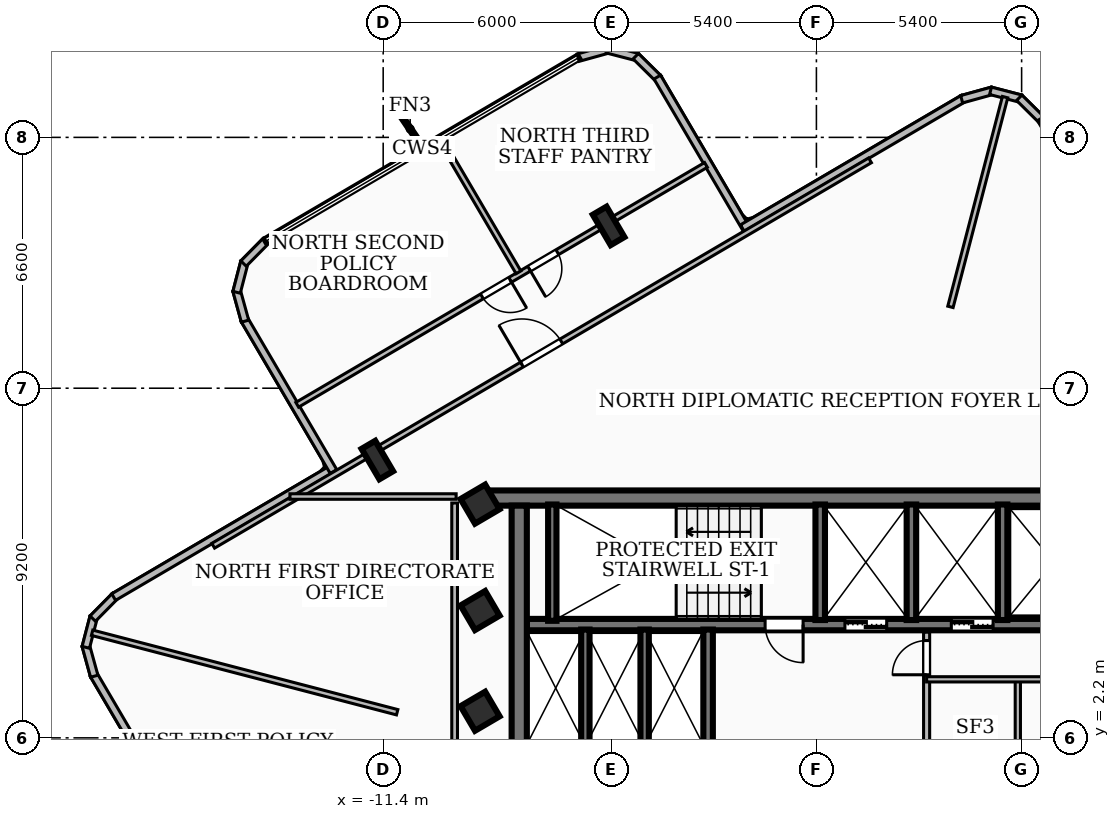
"""IFC4 building model, lengths in metres.
Left out: names, types, materials, properties, quantities, classifications, styles, units other than length and angle.
Written with IfcOpenShell. Run it as: python <this file> out.ifc"""

import sys

from ifc_helpers import new_model, si_unit, direction, frame, frame_2d, origin, origin_2d, place, context, subcontext, project, spatial, rectangle, i_section, extrude, element, fill, save


model = new_model("IFC4")
c1 = context("Model", 3, precision=1e-05, world=origin(), true_north=direction((0.0, 1.0)))
c2 = subcontext(c1, "Body", "Model", "MODEL_VIEW")
j1 = project(units=[si_unit("LENGTHUNIT", "METRE"), si_unit("PLANEANGLEUNIT", "RADIAN")], contexts=[c1])
p1 = place(None, origin())
s1 = spatial("IfcSite", under=j1, at=p1, CompositionType="ELEMENT")
p2 = place(p1, origin())
s2 = spatial("IfcBuilding", under=s1, at=p2, CompositionType="ELEMENT")
p3 = place(p2, frame((0.0, 0.0, 212.04)))
s3 = spatial("IfcBuildingStorey", under=s2, at=p3, CompositionType="ELEMENT", Elevation=212.04)
p4 = place(p3, frame((-8.78, 8.51, 0.0), z_axis=(0.0, 0.0, 1.0), x_axis=(1.0, 0.0, 0.0)))
e1 = element("IfcWall", 1, at=p4, inside=s3, PredefinedType="SHEAR", context=c2, shape_type="SweptSolid", body=[
    extrude(rectangle(XDim=17.56, YDim=0.4, at=frame_2d((8.78, 0.0))), origin(), (0.0, 0.0, 1.0), 3.16),
])
p5 = place(p3, frame((-7.82, 1.95, 0.0), z_axis=(0.0, 0.0, 1.0), x_axis=(0.0, 1.0, 0.0)))
e2 = element("IfcWall", 2, at=p5, inside=s3, PredefinedType="SHEAR", context=c2, shape_type="SweptSolid", body=[
    extrude(rectangle(XDim=6.36, YDim=0.4, at=frame_2d((3.18, 0.0))), origin(), (0.0, 0.0, 1.0), 3.16),
])
p6 = place(p3, frame((7.62, 5.18, 0.0), z_axis=(0.0, 0.0, 1.0), x_axis=(-1.0, 0.0, 0.0)))
e3 = element("IfcWall", 3, at=p6, inside=s3, PredefinedType="SOLIDWALL", context=c2, shape_type="SweptSolid", body=[
    extrude(rectangle(XDim=15.24, YDim=0.3, at=frame_2d((7.62, 0.0))), origin(), (0.0, 0.0, 1.0), 3.16),
])
p7 = place(p6, frame((5.77, 0.0, 0.0)))
e4 = element("IfcOpeningElement", 4, at=p7, cuts=e3, PredefinedType="OPENING", context=c2, shape_type="SweptSolid", body=[
    extrude(rectangle(XDim=1.1, YDim=2.15, at=frame_2d((0.55, 1.075))), frame((0.0, 0.16, 0.0), z_axis=(0.0, -1.0, 0.0), x_axis=(1.0, 0.0, 0.0)), (0.0, 0.0, 1.0), 0.32),
])
p8 = place(p6, frame((2.97, 0.0, 0.0)))
e5 = element("IfcOpeningElement", 5, at=p8, cuts=e3, PredefinedType="OPENING", context=c2, shape_type="SweptSolid", body=[
    extrude(rectangle(XDim=1.1, YDim=2.15, at=frame_2d((0.55, 1.075))), frame((0.0, 0.16, 0.0), z_axis=(0.0, -1.0, 0.0), x_axis=(1.0, 0.0, 0.0)), (0.0, 0.0, 1.0), 0.32),
])
p9 = place(p6, frame((7.97, 0.0, 0.0)))
e6 = element("IfcOpeningElement", 6, at=p9, cuts=e3, PredefinedType="OPENING", context=c2, shape_type="SweptSolid", body=[
    extrude(rectangle(XDim=1.0, YDim=2.1, at=frame_2d((0.5, 1.05))), frame((0.0, 0.16, 0.0), z_axis=(0.0, -1.0, 0.0), x_axis=(1.0, 0.0, 0.0)), (0.0, 0.0, 1.0), 0.32),
])
p10 = place(p3, frame((-6.95, 5.28, 0.0), z_axis=(0.0, 0.0, 1.0), x_axis=(0.0, 1.0, 0.0)))
e7 = element("IfcWall", 7, at=p10, inside=s3, PredefinedType="SOLIDWALL", context=c2, shape_type="SweptSolid", body=[
    extrude(rectangle(XDim=3.06, YDim=0.22, at=frame_2d((1.53, 0.0))), origin(), (0.0, 0.0, 1.0), 3.16),
])
for number, where, z_axis, x_axis in (
    (8, (0.1, 5.3, 0.0), (0.0, 0.0, 1.0), (0.0, 1.0, 0.0)),
    (9, (2.5, 5.3, 0.0), (0.0, 0.0, 1.0), (0.0, 1.0, 0.0)),
    (10, (4.9, 5.3, 0.0), (0.0, 0.0, 1.0), (0.0, 1.0, 0.0)),
):
    element("IfcWall", number, at=place(p3, frame(where, z_axis=z_axis, x_axis=x_axis)), inside=s3, PredefinedType="SOLIDWALL", context=c2, shape_type="SweptSolid", body=[
        extrude(rectangle(XDim=3.04, YDim=0.25, at=frame_2d((1.52, 0.0))), origin(), (0.0, 0.0, 1.0), 3.16),
    ])
p11 = place(p3, frame((-2.85, 1.98, 0.0), z_axis=(0.0, 0.0, 1.0), x_axis=(0.0, 1.0, 0.0)))
e11 = element("IfcWall", 11, at=p11, inside=s3, PredefinedType="SOLIDWALL", context=c2, shape_type="SweptSolid", body=[
    extrude(rectangle(XDim=3.07, YDim=0.25, at=frame_2d((1.535, 0.0))), origin(), (0.0, 0.0, 1.0), 3.16),
])
for number, where, z_axis, x_axis in (
    (12, (-6.08, 1.98, 0.0), (0.0, 0.0, 1.0), (0.0, 1.0, 0.0)),
    (13, (-4.52, 1.98, 0.0), (0.0, 0.0, 1.0), (0.0, 1.0, 0.0)),
):
    element("IfcWall", number, at=place(p3, frame(where, z_axis=z_axis, x_axis=x_axis)), inside=s3, PredefinedType="SOLIDWALL", context=c2, shape_type="SweptSolid", body=[
        extrude(rectangle(XDim=3.07, YDim=0.22, at=frame_2d((1.535, 0.0))), origin(), (0.0, 0.0, 1.0), 3.16),
    ])
for number, where, z_axis, x_axis in (
    (14, (-8.85, 2.9, 0.0), (0.0, 0.0, 1.0), (0.863, 0.506, 0.0)),
    (15, (-8.85, 5.55, 0.0), (0.0, 0.0, 1.0), (0.863, 0.506, 0.0)),
    (16, (-8.85, 8.35, 0.0), (0.0, 0.0, 1.0), (0.863, 0.506, 0.0)),
):
    element("IfcColumn", number, at=place(p3, frame(where, z_axis=z_axis, x_axis=x_axis)), inside=s3, PredefinedType="COLUMN", context=c2, shape_type="SweptSolid", body=[
        extrude(rectangle(XDim=0.75, YDim=0.75, at=origin_2d()), origin(), (0.0, 0.0, 1.0), 3.42),
    ])
for number, where, z_axis, x_axis in (
    (17, (-5.468, 15.671, 0.0), (0.0, 0.0, 1.0), (0.863, 0.506, 0.0)),
    (18, (-11.554, 9.51, 0.0), (0.0, 0.0, 1.0), (0.863, 0.506, 0.0)),
):
    element("IfcColumn", number, at=place(p3, frame(where, z_axis=z_axis, x_axis=x_axis)), inside=s3, PredefinedType="COLUMN", context=c2, shape_type="SweptSolid", body=[
        extrude(i_section(OverallWidth=0.418, OverallDepth=0.927, WebThickness=0.019, FlangeThickness=0.032, at=origin_2d()), origin(), (0.0, 0.0, 1.0), 3.42),
    ])
p12 = place(p3, frame((-5.904, -18.492, 0.0), z_axis=(0.0, 0.0, 1.0), x_axis=(-0.506046465446, 0.862506217258, 0.0)))
e19 = element("IfcWall", 19, at=p12, inside=s3, PredefinedType="SOLIDWALL", context=c2, shape_type="SweptSolid", body=[
    extrude(rectangle(XDim=25.924, YDim=0.2, at=frame_2d((12.962, 0.0))), origin(), (0.0, 0.0, 1.0), 3.16),
])
p13 = place(p12, frame((0.85, 0.0, 0.85)))
e20 = element("IfcOpeningElement", 20, at=p13, cuts=e19, PredefinedType="OPENING", context=c2, shape_type="SweptSolid", body=[
    extrude(rectangle(XDim=2.4, YDim=1.85, at=frame_2d((1.2, 0.925))), frame((0.0, 0.11, 0.0), z_axis=(0.0, -1.0, 0.0), x_axis=(1.0, 0.0, 0.0)), (0.0, 0.0, 1.0), 0.22),
])
p14 = place(p3, frame((-19.003, 3.822, 0.0), z_axis=(0.0, 0.0, 1.0), x_axis=(-0.266246353668, 0.963905015631, 0.0)))
e21 = element("IfcWall", 21, at=p14, inside=s3, PredefinedType="SOLIDWALL", context=c2, shape_type="SweptSolid", body=[
    extrude(rectangle(XDim=0.838, YDim=0.2, at=frame_2d((0.419, 0.0))), origin(), (0.0, 0.0, 1.0), 3.16),
])
p15 = place(p3, frame((-19.225, 4.582, 0.0), z_axis=(0.0, 0.0, 1.0), x_axis=(0.251167733737, 0.967943577658, 0.0)))
e22 = element("IfcWall", 22, at=p15, inside=s3, PredefinedType="SOLIDWALL", context=c2, shape_type="SweptSolid", body=[
    extrude(rectangle(XDim=0.824, YDim=0.2, at=frame_2d((0.412, 0.0))), origin(), (0.0, 0.0, 1.0), 3.16),
])
p16 = place(p3, frame((-19.042, 5.338, 0.0), z_axis=(0.0, 0.0, 1.0), x_axis=(0.702877524881, 0.711310891957, 0.0)))
e23 = element("IfcWall", 23, at=p16, inside=s3, PredefinedType="SOLIDWALL", context=c2, shape_type="SweptSolid", body=[
    extrude(rectangle(XDim=0.84, YDim=0.2, at=frame_2d((0.42, 0.0))), origin(), (0.0, 0.0, 1.0), 3.16),
])
p17 = place(p3, frame((-18.492, 5.904, 0.0), z_axis=(0.0, 0.0, 1.0), x_axis=(0.86245977502, 0.506125613333, 0.0)))
e24 = element("IfcWall", 24, at=p17, inside=s3, PredefinedType="SOLIDWALL", context=c2, shape_type="SweptSolid", body=[
    extrude(rectangle(XDim=6.741, YDim=0.2, at=frame_2d((3.371, 0.0))), origin(), (0.0, 0.0, 1.0), 3.16),
])
p18 = place(p3, frame((-12.707, 9.207, 0.0), z_axis=(0.0, 0.0, 1.0), x_axis=(-0.505936854923, 0.862570518178, 0.0)))
e25 = element("IfcWall", 25, at=p18, inside=s3, PredefinedType="SOLIDWALL", context=c2, shape_type="SweptSolid", body=[
    extrude(rectangle(XDim=4.641, YDim=0.2, at=frame_2d((2.32, 0.0))), origin(), (0.0, 0.0, 1.0), 3.16),
])
p19 = place(p3, frame((-15.035, 13.164, 0.0), z_axis=(0.0, 0.0, 1.0), x_axis=(-0.266246353668, 0.963905015631, 0.0)))
e26 = element("IfcWall", 26, at=p19, inside=s3, PredefinedType="SOLIDWALL", context=c2, shape_type="SweptSolid", body=[
    extrude(rectangle(XDim=0.838, YDim=0.2, at=frame_2d((0.419, 0.0))), origin(), (0.0, 0.0, 1.0), 3.16),
])
p20 = place(p3, frame((-15.257, 13.924, 0.0), z_axis=(0.0, 0.0, 1.0), x_axis=(0.251167733737, 0.967943577658, 0.0)))
e27 = element("IfcWall", 27, at=p20, inside=s3, PredefinedType="SOLIDWALL", context=c2, shape_type="SweptSolid", body=[
    extrude(rectangle(XDim=0.824, YDim=0.2, at=frame_2d((0.412, 0.0))), origin(), (0.0, 0.0, 1.0), 3.16),
])
p21 = place(p3, frame((-15.074, 14.68, 0.0), z_axis=(0.0, 0.0, 1.0), x_axis=(0.702877524881, 0.711310891957, 0.0)))
e28 = element("IfcWall", 28, at=p21, inside=s3, PredefinedType="SOLIDWALL", context=c2, shape_type="SweptSolid", body=[
    extrude(rectangle(XDim=0.84, YDim=0.2, at=frame_2d((0.42, 0.0))), origin(), (0.0, 0.0, 1.0), 3.16),
])
p22 = place(p3, frame((-6.269, 20.097, 0.0), z_axis=(0.0, 0.0, 1.0), x_axis=(0.963925656212, 0.266171616247, 0.0)))
e29 = element("IfcWall", 29, at=p22, inside=s3, PredefinedType="SOLIDWALL", context=c2, shape_type="SweptSolid", body=[
    extrude(rectangle(XDim=0.838, YDim=0.2, at=frame_2d((0.419, 0.0))), origin(), (0.0, 0.0, 1.0), 3.16),
])
p23 = place(p3, frame((-5.509, 20.319, 0.0), z_axis=(0.0, 0.0, 1.0), x_axis=(0.967962254737, -0.251095745493, 0.0)))
e30 = element("IfcWall", 30, at=p23, inside=s3, PredefinedType="SOLIDWALL", context=c2, shape_type="SweptSolid", body=[
    extrude(rectangle(XDim=0.824, YDim=0.2, at=frame_2d((0.412, 0.0))), origin(), (0.0, 0.0, 1.0), 3.16),
])
p24 = place(p3, frame((-4.753, 20.136, 0.0), z_axis=(0.0, 0.0, 1.0), x_axis=(0.711167178618, -0.70302293281, 0.0)))
e31 = element("IfcWall", 31, at=p24, inside=s3, PredefinedType="SOLIDWALL", context=c2, shape_type="SweptSolid", body=[
    extrude(rectangle(XDim=0.839, YDim=0.2, at=frame_2d((0.42, 0.0))), origin(), (0.0, 0.0, 1.0), 3.16),
])
p25 = place(p3, frame((-4.187, 19.586, 0.0), z_axis=(0.0, 0.0, 1.0), x_axis=(0.505936854923, -0.862570518178, 0.0)))
e32 = element("IfcWall", 32, at=p25, inside=s3, PredefinedType="SOLIDWALL", context=c2, shape_type="SweptSolid", body=[
    extrude(rectangle(XDim=4.641, YDim=0.2, at=frame_2d((2.32, 0.0))), origin(), (0.0, 0.0, 1.0), 3.16),
])
p26 = place(p3, frame((-1.948, 15.612, 0.0), z_axis=(0.0, 0.0, 1.0), x_axis=(0.86259717351, 0.505891407569, 0.0)))
e33 = element("IfcWall", 33, at=p26, inside=s3, PredefinedType="SOLIDWALL", context=c2, shape_type="SweptSolid", body=[
    extrude(rectangle(XDim=6.742, YDim=0.2, at=frame_2d((3.371, 0.0))), origin(), (0.0, 0.0, 1.0), 3.16),
])
p27 = place(p3, frame((3.822, 19.003, 0.0), z_axis=(0.0, 0.0, 1.0), x_axis=(0.963905015631, 0.266246353668, 0.0)))
e34 = element("IfcWall", 34, at=p27, inside=s3, PredefinedType="SOLIDWALL", context=c2, shape_type="SweptSolid", body=[
    extrude(rectangle(XDim=0.838, YDim=0.2, at=frame_2d((0.419, 0.0))), origin(), (0.0, 0.0, 1.0), 3.16),
])
p28 = place(p3, frame((4.582, 19.225, 0.0), z_axis=(0.0, 0.0, 1.0), x_axis=(0.967943577658, -0.251167733737, 0.0)))
e35 = element("IfcWall", 35, at=p28, inside=s3, PredefinedType="SOLIDWALL", context=c2, shape_type="SweptSolid", body=[
    extrude(rectangle(XDim=0.824, YDim=0.2, at=frame_2d((0.412, 0.0))), origin(), (0.0, 0.0, 1.0), 3.16),
])
p29 = place(p3, frame((5.338, 19.042, 0.0), z_axis=(0.0, 0.0, 1.0), x_axis=(0.711310891957, -0.702877524881, 0.0)))
e36 = element("IfcWall", 36, at=p29, inside=s3, PredefinedType="SOLIDWALL", context=c2, shape_type="SweptSolid", body=[
    extrude(rectangle(XDim=0.84, YDim=0.2, at=frame_2d((0.42, 0.0))), origin(), (0.0, 0.0, 1.0), 3.16),
])
p30 = place(p3, frame((5.904, 18.492, 0.0), z_axis=(0.0, 0.0, 1.0), x_axis=(0.506017844805, -0.862523008817, 0.0)))
e37 = element("IfcWall", 37, at=p30, inside=s3, PredefinedType="SOLIDWALL", context=c2, shape_type="SweptSolid", body=[
    extrude(rectangle(XDim=6.741, YDim=0.2, at=frame_2d((3.37, 0.0))), origin(), (0.0, 0.0, 1.0), 3.16),
])
p31 = place(p3, frame((2.9, 2.04, 0.0), z_axis=(0.0, 0.0, 1.0), x_axis=(0.0, 1.0, 0.0)))
e38 = element("IfcWall", 38, at=p31, inside=s3, PredefinedType="PARTITIONING", context=c2, shape_type="SweptSolid", body=[
    extrude(rectangle(XDim=2.94, YDim=0.16, at=frame_2d((1.47, 0.0))), origin(), (0.0, 0.0, 1.0), 2.39),
])
p32 = place(p31, frame((1.82, 0.0, 0.0)))
e39 = element("IfcOpeningElement", 39, at=p32, cuts=e38, PredefinedType="OPENING", context=c2, shape_type="SweptSolid", body=[
    extrude(rectangle(XDim=0.9, YDim=2.06, at=frame_2d((0.45, 1.03))), frame((0.0, 0.09, 0.0), z_axis=(0.0, -1.0, 0.0), x_axis=(1.0, 0.0, 0.0)), (0.0, 0.0, 1.0), 0.18),
])
p33 = place(p3, frame((2.9, 3.74, 0.0), z_axis=(0.0, 0.0, 1.0), x_axis=(1.0, 0.0, 0.0)))
e40 = element("IfcWall", 40, at=p33, inside=s3, PredefinedType="PARTITIONING", context=c2, shape_type="SweptSolid", body=[
    extrude(rectangle(XDim=4.65, YDim=0.138, at=frame_2d((2.325, 0.0))), origin(), (0.0, 0.0, 1.0), 3.16),
])
p34 = place(p3, frame((5.3, 1.85, 0.0), z_axis=(0.0, 0.0, 1.0), x_axis=(0.0, 1.0, 0.0)))
e41 = element("IfcWall", 41, at=p34, inside=s3, PredefinedType="PARTITIONING", context=c2, shape_type="SweptSolid", body=[
    extrude(rectangle(XDim=1.89, YDim=0.138, at=frame_2d((0.945, 0.0))), origin(), (0.0, 0.0, 1.0), 2.39),
])
p35 = place(p3, frame((-9.52, 1.75, 0.0), z_axis=(0.0, 0.0, 1.0), x_axis=(0.0, 1.0, 0.0)))
e42 = element("IfcWall", 42, at=p35, inside=s3, PredefinedType="PARTITIONING", context=c2, shape_type="SweptSolid", body=[
    extrude(rectangle(XDim=6.63, YDim=0.15, at=frame_2d((3.315, 0.0))), origin(), (0.0, 0.0, 1.0), 3.16),
])
p36 = place(p3, frame((-13.854, 8.55, 0.0), z_axis=(0.0, 0.0, 1.0), x_axis=(1.0, 0.0, 0.0)))
e43 = element("IfcWall", 43, at=p36, inside=s3, PredefinedType="PARTITIONING", context=c2, shape_type="SweptSolid", body=[
    extrude(rectangle(XDim=4.374, YDim=0.145, at=frame_2d((2.187, 0.0))), origin(), (0.0, 0.0, 1.0), 2.53),
])
p37 = place(p3, frame((3.527, 13.54, 0.0), z_axis=(0.0, 0.0, 1.0), x_axis=(0.252132617321, 0.967692690519, 0.0)))
e44 = element("IfcWall", 44, at=p37, inside=s3, PredefinedType="PARTITIONING", context=c2, shape_type="SweptSolid", body=[
    extrude(rectangle(XDim=5.703, YDim=0.145, at=frame_2d((2.852, 0.0))), origin(), (0.0, 0.0, 1.0), 3.16),
])
p38 = place(p3, frame((-11.032, 2.874, 0.0), z_axis=(0.0, 0.0, 1.0), x_axis=(-0.967704417597, 0.252087604146, 0.0)))
e45 = element("IfcWall", 45, at=p38, inside=s3, PredefinedType="PARTITIONING", context=c2, shape_type="SweptSolid", body=[
    extrude(rectangle(XDim=8.295, YDim=0.145, at=frame_2d((4.147, 0.0))), origin(), (0.0, 0.0, 1.0), 3.16),
])
p39 = place(p3, frame((-15.873, 7.255, 0.0), z_axis=(0.0, 0.0, 1.0), x_axis=(0.862498672631, 0.506059324299, 0.0)))
e46 = element("IfcWall", 46, at=p39, inside=s3, PredefinedType="PARTITIONING", context=c2, shape_type="SweptSolid", body=[
    extrude(rectangle(XDim=20.039, YDim=0.145, at=frame_2d((10.02, 0.0))), origin(), (0.0, 0.0, 1.0), 2.53),
])
p40 = place(p39, frame((9.42, 0.0, 0.0)))
e47 = element("IfcOpeningElement", 47, at=p40, cuts=e46, PredefinedType="OPENING", context=c2, shape_type="SweptSolid", body=[
    extrude(rectangle(XDim=1.2, YDim=2.1, at=frame_2d((0.6, 1.05))), frame((0.0, 0.083, 0.0), z_axis=(0.0, -1.0, 0.0), x_axis=(1.0, 0.0, 0.0)), (0.0, 0.0, 1.0), 0.165),
])
p41 = place(p3, frame((-7.84, 14.449, 0.0), z_axis=(0.0, 0.0, 1.0), x_axis=(-0.505991637753, 0.862538383218, 0.0)))
e48 = element("IfcWall", 48, at=p41, inside=s3, PredefinedType="PARTITIONING", context=c2, shape_type="SweptSolid", body=[
    extrude(rectangle(XDim=4.006, YDim=0.145, at=frame_2d((2.003, 0.0))), origin(), (0.0, 0.0, 1.0), 3.16),
])
p42 = place(p3, frame((-2.906, 17.275, 0.0), z_axis=(0.0, 0.0, 1.0), x_axis=(-0.862505879614, -0.506047040927, 0.0)))
e49 = element("IfcWall", 49, at=p42, inside=s3, PredefinedType="PARTITIONING", context=c2, shape_type="SweptSolid", body=[
    extrude(rectangle(XDim=12.471, YDim=0.145, at=frame_2d((6.235, 0.0))), origin(), (0.0, 0.0, 1.0), 2.53),
])
p43 = place(p42, frame((4.535, 0.0, 0.0)))
e50 = element("IfcOpeningElement", 50, at=p43, cuts=e49, PredefinedType="OPENING", context=c2, shape_type="SweptSolid", body=[
    extrude(rectangle(XDim=0.86, YDim=2.04, at=frame_2d((0.43, 1.02))), frame((0.0, 0.083, 0.0), z_axis=(0.0, -1.0, 0.0), x_axis=(1.0, 0.0, 0.0)), (0.0, 0.0, 1.0), 0.165),
])
p44 = place(p42, frame((5.975, 0.0, 0.0)))
e51 = element("IfcOpeningElement", 51, at=p44, cuts=e49, PredefinedType="OPENING", context=c2, shape_type="SweptSolid", body=[
    extrude(rectangle(XDim=0.86, YDim=2.04, at=frame_2d((0.43, 1.02))), frame((0.0, 0.083, 0.0), z_axis=(0.0, -1.0, 0.0), x_axis=(1.0, 0.0, 0.0)), (0.0, 0.0, 1.0), 0.165),
])
p45 = place(p7, origin())
e52 = element("IfcDoor", 52, at=p45, inside=s3, OperationType="DOUBLE_DOOR_SLIDING", PredefinedType="DOOR", context=c2, shape_type="SweptSolid", body=[
    extrude(rectangle(XDim=1.1, YDim=2.15, at=frame_2d((0.55, 1.075))), frame((0.0, 0.025, 0.0), z_axis=(0.0, -1.0, 0.0), x_axis=(1.0, 0.0, 0.0)), (0.0, 0.0, 1.0), 0.05),
])
fill(e4, e52)
p46 = place(p8, origin())
e53 = element("IfcDoor", 53, at=p46, inside=s3, OperationType="DOUBLE_DOOR_SLIDING", PredefinedType="DOOR", context=c2, shape_type="SweptSolid", body=[
    extrude(rectangle(XDim=1.1, YDim=2.15, at=frame_2d((0.55, 1.075))), frame((0.0, 0.025, 0.0), z_axis=(0.0, -1.0, 0.0), x_axis=(1.0, 0.0, 0.0)), (0.0, 0.0, 1.0), 0.05),
])
fill(e5, e53)
p47 = place(p9, origin())
e54 = element("IfcDoor", 54, at=p47, inside=s3, OperationType="SINGLE_SWING_LEFT", PredefinedType="DOOR", context=c2, shape_type="SweptSolid", body=[
    extrude(rectangle(XDim=1.0, YDim=2.1, at=frame_2d((0.5, 1.05))), frame((0.0, 0.025, 0.0), z_axis=(0.0, -1.0, 0.0), x_axis=(1.0, 0.0, 0.0)), (0.0, 0.0, 1.0), 0.05),
])
fill(e6, e54)
p48 = place(p32, origin())
e55 = element("IfcDoor", 55, at=p48, inside=s3, OperationType="SINGLE_SWING_LEFT", PredefinedType="DOOR", context=c2, shape_type="SweptSolid", body=[
    extrude(rectangle(XDim=0.9, YDim=2.06, at=frame_2d((0.45, 1.03))), frame((0.0, 0.025, 0.0), z_axis=(0.0, -1.0, 0.0), x_axis=(1.0, 0.0, 0.0)), (0.0, 0.0, 1.0), 0.05),
])
fill(e39, e55)
p49 = place(p40, origin())
e56 = element("IfcDoor", 56, at=p49, inside=s3, OperationType="SINGLE_SWING_LEFT", PredefinedType="DOOR", context=c2, shape_type="SweptSolid", body=[
    extrude(rectangle(XDim=1.2, YDim=2.1, at=frame_2d((0.6, 1.05))), frame((0.0, 0.025, 0.0), z_axis=(0.0, -1.0, 0.0), x_axis=(1.0, 0.0, 0.0)), (0.0, 0.0, 1.0), 0.05),
])
fill(e47, e56)
p50 = place(p43, origin())
e57 = element("IfcDoor", 57, at=p50, inside=s3, OperationType="SINGLE_SWING_RIGHT", PredefinedType="DOOR", context=c2, shape_type="SweptSolid", body=[
    extrude(rectangle(XDim=0.86, YDim=2.04, at=frame_2d((0.43, 1.02))), frame((0.0, 0.025, 0.0), z_axis=(0.0, -1.0, 0.0), x_axis=(1.0, 0.0, 0.0)), (0.0, 0.0, 1.0), 0.05),
])
fill(e50, e57)
p51 = place(p44, origin())
e58 = element("IfcDoor", 58, at=p51, inside=s3, OperationType="SINGLE_SWING_LEFT", PredefinedType="DOOR", context=c2, shape_type="SweptSolid", body=[
    extrude(rectangle(XDim=0.86, YDim=2.04, at=frame_2d((0.43, 1.02))), frame((0.0, 0.025, 0.0), z_axis=(0.0, -1.0, 0.0), x_axis=(1.0, 0.0, 0.0)), (0.0, 0.0, 1.0), 0.05),
])
fill(e51, e58)
save(model, sys.argv[1])
